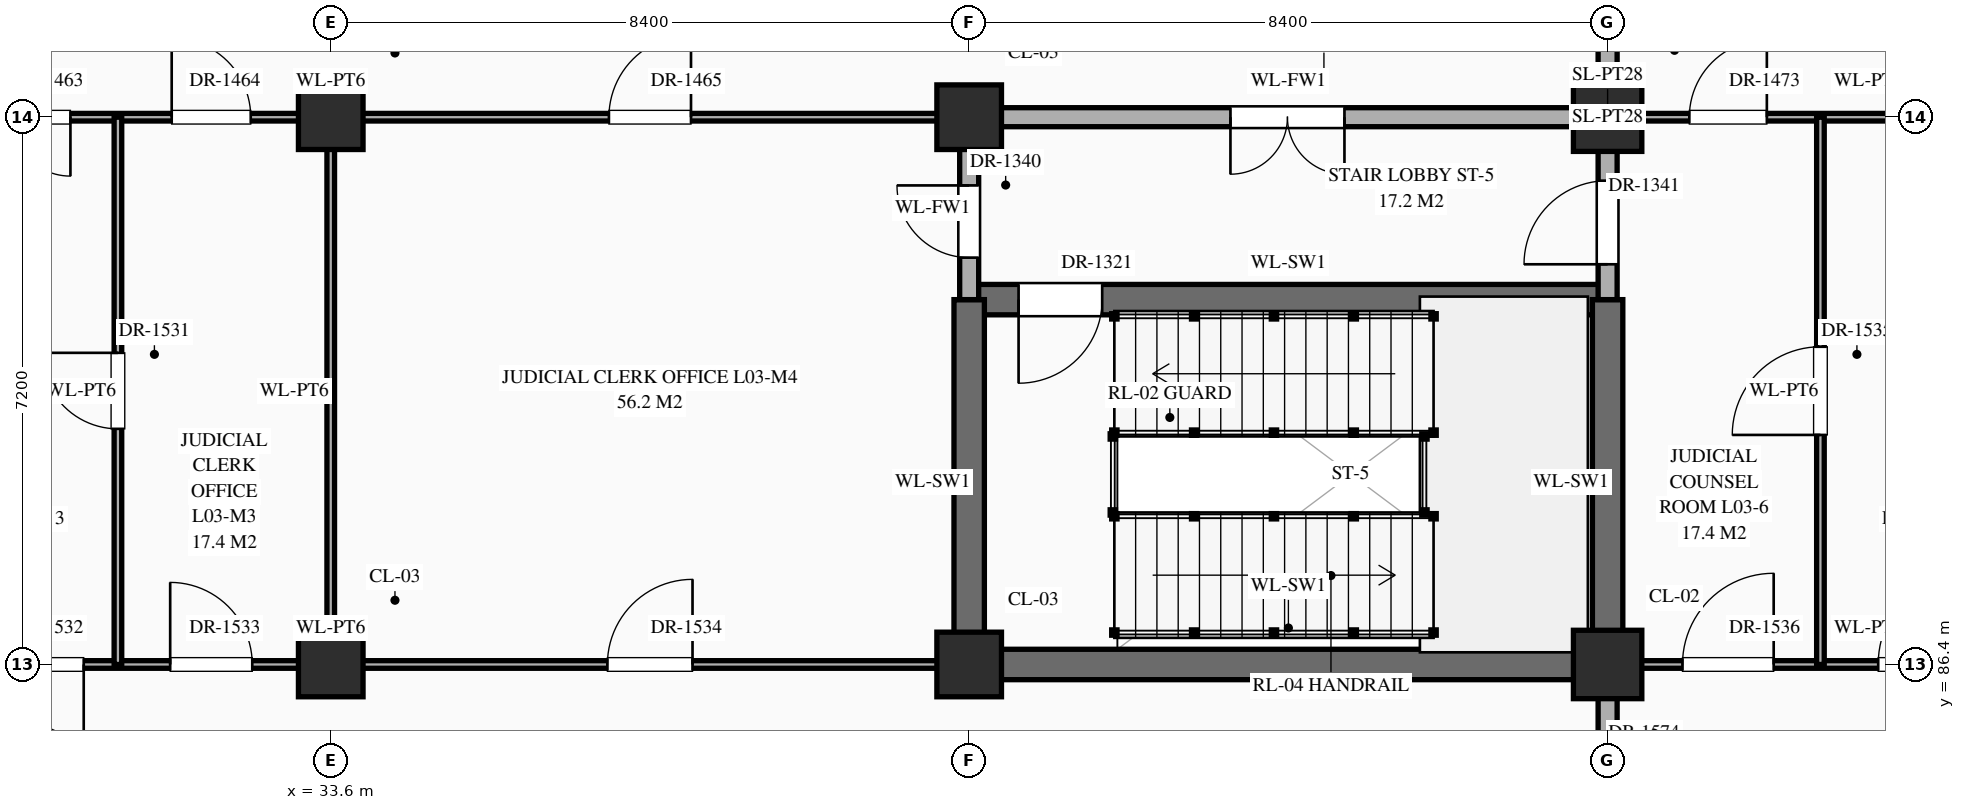
"""IFC4 building model, lengths in metres.
Left out: names, types, materials, properties, quantities, classifications, styles, units other than length and angle.
Written with IfcOpenShell. Run it as: python <this file> out.ifc"""

import sys

from ifc_helpers import new_model, si_unit, direction, frame, frame_2d, origin, origin_2d, place, context, subcontext, project, spatial, rectangle, extrude, element, fill, save


model = new_model("IFC4")
c1 = context("Model", 3, precision=1e-05, world=origin(), true_north=direction((0.0, 1.0)))
c2 = subcontext(c1, "Body", "Model", "MODEL_VIEW")
j1 = project(units=[si_unit("LENGTHUNIT", "METRE"), si_unit("PLANEANGLEUNIT", "RADIAN")], contexts=[c1])
p1 = place(None, origin())
s1 = spatial("IfcSite", under=j1, at=p1, CompositionType="ELEMENT")
p2 = place(p1, origin())
s2 = spatial("IfcBuilding", under=s1, at=p2, CompositionType="ELEMENT")
p3 = place(p2, frame((0.0, 0.0, 10.8)))
s3 = spatial("IfcBuildingStorey", under=s2, at=p3, CompositionType="ELEMENT", Elevation=10.8)
for number, where, z_axis, x_axis in (
    (1, (33.6, 86.4, 0.0), (0.0, 0.0, 1.0), (1.0, 0.0, 0.0)),
    (2, (33.6, 93.6, 0.0), (0.0, 0.0, 1.0), (1.0, 0.0, 0.0)),
    (3, (42.0, 86.4, 0.0), (0.0, 0.0, 1.0), (1.0, 0.0, 0.0)),
    (4, (42.0, 93.6, 0.0), (0.0, 0.0, 1.0), (1.0, 0.0, 0.0)),
):
    element("IfcColumn", number, at=place(p3, frame(where, z_axis=z_axis, x_axis=x_axis)), inside=s3, PredefinedType="COLUMN", context=c2, shape_type="SweptSolid", body=[
        extrude(rectangle(XDim=0.85, YDim=0.85, at=origin_2d()), origin(), (0.0, 0.0, 1.0), 5.4),
    ])
for number, where, z_axis, x_axis in (
    (5, (50.4, 86.4, 0.0), (0.0, 0.0, 1.0), (1.0, 0.0, 0.0)),
    (6, (50.4, 93.6, 0.0), (0.0, 0.0, 1.0), (1.0, 0.0, 0.0)),
):
    element("IfcColumn", number, at=place(p3, frame(where, z_axis=z_axis, x_axis=x_axis)), inside=s3, PredefinedType="COLUMN", context=c2, shape_type="SweptSolid", body=[
        extrude(rectangle(XDim=0.9, YDim=0.9, at=origin_2d()), origin(), (0.0, 0.0, 1.0), 5.4),
    ])
p4 = place(p3, frame((25.2, 86.4, 0.0), z_axis=(0.0, 0.0, 1.0), x_axis=(1.0, 0.0, 0.0)))
e7 = element("IfcWall", 7, at=p4, inside=s3, PredefinedType="STANDARD", context=c2, shape_type="SweptSolid", body=[
    extrude(rectangle(XDim=16.8, YDim=0.1, at=frame_2d((8.4, 0.0))), origin(), (0.0, 0.0, 1.0), 4.27),
])
p5 = place(p4, frame((1.093, 0.0, 0.0)))
e8 = element("IfcOpeningElement", 8, at=p5, cuts=e7, PredefinedType="OPENING", context=c2, shape_type="SweptSolid", body=[
    extrude(rectangle(XDim=0.96, YDim=2.2, at=frame_2d((0.48, 1.1))), frame((0.0, 0.062, 0.0), z_axis=(0.0, -1.0, 0.0), x_axis=(1.0, 0.0, 0.0)), (0.0, 0.0, 1.0), 0.124),
])
p6 = place(p4, frame((3.25, 0.0, 0.0)))
e9 = element("IfcOpeningElement", 9, at=p6, cuts=e7, PredefinedType="OPENING", context=c2, shape_type="SweptSolid", body=[
    extrude(rectangle(XDim=1.9, YDim=2.5, at=frame_2d((0.95, 1.25))), frame((0.0, 0.062, 0.0), z_axis=(0.0, -1.0, 0.0), x_axis=(1.0, 0.0, 0.0)), (0.0, 0.0, 1.0), 0.124),
])
p7 = place(p4, frame((6.288, 0.0, 0.0)))
e10 = element("IfcOpeningElement", 10, at=p7, cuts=e7, PredefinedType="OPENING", context=c2, shape_type="SweptSolid", body=[
    extrude(rectangle(XDim=1.08, YDim=2.25, at=frame_2d((0.54, 1.125))), frame((0.0, 0.062, 0.0), z_axis=(0.0, -1.0, 0.0), x_axis=(1.0, 0.0, 0.0)), (0.0, 0.0, 1.0), 0.124),
])
p8 = place(p4, frame((12.04, 0.0, 0.0)))
e11 = element("IfcOpeningElement", 11, at=p8, cuts=e7, PredefinedType="OPENING", context=c2, shape_type="SweptSolid", body=[
    extrude(rectangle(XDim=1.12, YDim=2.25, at=frame_2d((0.56, 1.125))), frame((0.0, 0.062, 0.0), z_axis=(0.0, -1.0, 0.0), x_axis=(1.0, 0.0, 0.0)), (0.0, 0.0, 1.0), 0.124),
])
p9 = place(p3, frame((42.0, 86.4, 0.0), z_axis=(0.0, 0.0, 1.0), x_axis=(1.0, 0.0, 0.0)))
e12 = element("IfcWall", 12, at=p9, inside=s3, PredefinedType="SHEAR", context=c2, shape_type="SweptSolid", body=[
    extrude(rectangle(XDim=8.4, YDim=0.4, at=frame_2d((4.2, 0.0))), origin(), (0.0, 0.0, 1.0), 5.12),
])
p10 = place(p3, frame((50.4, 86.4, 0.0), z_axis=(0.0, 0.0, 1.0), x_axis=(1.0, 0.0, 0.0)))
e13 = element("IfcWall", 13, at=p10, inside=s3, PredefinedType="STANDARD", context=c2, shape_type="SweptSolid", body=[
    extrude(rectangle(XDim=8.4, YDim=0.1, at=frame_2d((4.2, 0.0))), origin(), (0.0, 0.0, 1.0), 4.27),
])
p11 = place(p10, frame((0.985, 0.0, 0.0)))
e14 = element("IfcOpeningElement", 14, at=p11, cuts=e13, PredefinedType="OPENING", context=c2, shape_type="SweptSolid", body=[
    extrude(rectangle(XDim=1.2, YDim=2.35, at=frame_2d((0.6, 1.175))), frame((0.0, 0.062, 0.0), z_axis=(0.0, -1.0, 0.0), x_axis=(1.0, 0.0, 0.0)), (0.0, 0.0, 1.0), 0.124),
])
p12 = place(p10, frame((3.56, 0.0, 0.0)))
e15 = element("IfcOpeningElement", 15, at=p12, cuts=e13, PredefinedType="OPENING", context=c2, shape_type="SweptSolid", body=[
    extrude(rectangle(XDim=1.28, YDim=2.35, at=frame_2d((0.64, 1.175))), frame((0.0, 0.062, 0.0), z_axis=(0.0, -1.0, 0.0), x_axis=(1.0, 0.0, 0.0)), (0.0, 0.0, 1.0), 0.124),
])
p13 = place(p10, frame((6.345, 0.0, 0.0)))
e16 = element("IfcOpeningElement", 16, at=p13, cuts=e13, PredefinedType="OPENING", context=c2, shape_type="SweptSolid", body=[
    extrude(rectangle(XDim=0.94, YDim=2.3, at=frame_2d((0.47, 1.15))), frame((0.0, 0.062, 0.0), z_axis=(0.0, -1.0, 0.0), x_axis=(1.0, 0.0, 0.0)), (0.0, 0.0, 1.0), 0.124),
])
p14 = place(p3, frame((42.0, 91.2, 0.0), z_axis=(0.0, 0.0, 1.0), x_axis=(1.0, 0.0, 0.0)))
e17 = element("IfcWall", 17, at=p14, inside=s3, PredefinedType="SHEAR", context=c2, shape_type="SweptSolid", body=[
    extrude(rectangle(XDim=8.4, YDim=0.4, at=frame_2d((4.2, 0.0))), origin(), (0.0, 0.0, 1.0), 5.12),
])
p15 = place(p14, frame((0.65, 0.0, 0.0)))
e18 = element("IfcOpeningElement", 18, at=p15, cuts=e17, PredefinedType="OPENING", context=c2, shape_type="SweptSolid", body=[
    extrude(rectangle(XDim=1.1, YDim=2.2, at=frame_2d((0.55, 1.1))), frame((0.0, 0.212, 0.0), z_axis=(0.0, -1.0, 0.0), x_axis=(1.0, 0.0, 0.0)), (0.0, 0.0, 1.0), 0.424),
])
p16 = place(p3, frame((25.2, 93.6, 0.0), z_axis=(0.0, 0.0, 1.0), x_axis=(1.0, 0.0, 0.0)))
e19 = element("IfcWall", 19, at=p16, inside=s3, PredefinedType="STANDARD", context=c2, shape_type="SweptSolid", body=[
    extrude(rectangle(XDim=16.8, YDim=0.1, at=frame_2d((8.4, 0.0))), origin(), (0.0, 0.0, 1.0), 4.27),
])
p17 = place(p16, frame((1.093, 0.0, 0.0)))
e20 = element("IfcOpeningElement", 20, at=p17, cuts=e19, PredefinedType="OPENING", context=c2, shape_type="SweptSolid", body=[
    extrude(rectangle(XDim=0.96, YDim=2.2, at=frame_2d((0.48, 1.1))), frame((0.0, 0.062, 0.0), z_axis=(0.0, -1.0, 0.0), x_axis=(1.0, 0.0, 0.0)), (0.0, 0.0, 1.0), 0.124),
])
p18 = place(p16, frame((3.425, 0.0, 0.0)))
e21 = element("IfcOpeningElement", 21, at=p18, cuts=e19, PredefinedType="OPENING", context=c2, shape_type="SweptSolid", body=[
    extrude(rectangle(XDim=1.55, YDim=2.35, at=frame_2d((0.775, 1.175))), frame((0.0, 0.062, 0.0), z_axis=(0.0, -1.0, 0.0), x_axis=(1.0, 0.0, 0.0)), (0.0, 0.0, 1.0), 0.124),
])
p19 = place(p16, frame((6.308, 0.0, 0.0)))
e22 = element("IfcOpeningElement", 22, at=p19, cuts=e19, PredefinedType="OPENING", context=c2, shape_type="SweptSolid", body=[
    extrude(rectangle(XDim=1.04, YDim=2.2, at=frame_2d((0.52, 1.1))), frame((0.0, 0.062, 0.0), z_axis=(0.0, -1.0, 0.0), x_axis=(1.0, 0.0, 0.0)), (0.0, 0.0, 1.0), 0.124),
])
p20 = place(p16, frame((12.06, 0.0, 0.0)))
e23 = element("IfcOpeningElement", 23, at=p20, cuts=e19, PredefinedType="OPENING", context=c2, shape_type="SweptSolid", body=[
    extrude(rectangle(XDim=1.08, YDim=2.25, at=frame_2d((0.54, 1.125))), frame((0.0, 0.062, 0.0), z_axis=(0.0, -1.0, 0.0), x_axis=(1.0, 0.0, 0.0)), (0.0, 0.0, 1.0), 0.124),
])
p21 = place(p3, frame((42.0, 93.6, 0.0), z_axis=(0.0, 0.0, 1.0), x_axis=(1.0, 0.0, 0.0)))
e24 = element("IfcWall", 24, at=p21, inside=s3, PredefinedType="STANDARD", context=c2, shape_type="SweptSolid", body=[
    extrude(rectangle(XDim=8.4, YDim=0.25, at=frame_2d((4.2, 0.0))), origin(), (0.0, 0.0, 1.0), 4.27),
])
p22 = place(p21, frame((3.438, 0.0, 0.0)))
e25 = element("IfcOpeningElement", 25, at=p22, cuts=e24, PredefinedType="OPENING", context=c2, shape_type="SweptSolid", body=[
    extrude(rectangle(XDim=1.5, YDim=2.25, at=frame_2d((0.75, 1.125))), frame((0.0, 0.137, 0.0), z_axis=(0.0, -1.0, 0.0), x_axis=(1.0, 0.0, 0.0)), (0.0, 0.0, 1.0), 0.274),
])
p23 = place(p3, frame((50.4, 93.6, 0.0), z_axis=(0.0, 0.0, 1.0), x_axis=(1.0, 0.0, 0.0)))
e26 = element("IfcWall", 26, at=p23, inside=s3, PredefinedType="STANDARD", context=c2, shape_type="SweptSolid", body=[
    extrude(rectangle(XDim=8.4, YDim=0.1, at=frame_2d((4.2, 0.0))), origin(), (0.0, 0.0, 1.0), 4.27),
])
p24 = place(p23, frame((1.075, 0.0, 0.0)))
e27 = element("IfcOpeningElement", 27, at=p24, cuts=e26, PredefinedType="OPENING", context=c2, shape_type="SweptSolid", body=[
    extrude(rectangle(XDim=1.02, YDim=2.4, at=frame_2d((0.51, 1.2))), frame((0.0, 0.062, 0.0), z_axis=(0.0, -1.0, 0.0), x_axis=(1.0, 0.0, 0.0)), (0.0, 0.0, 1.0), 0.124),
])
p25 = place(p23, frame((3.67, 0.0, 0.0)))
e28 = element("IfcOpeningElement", 28, at=p25, cuts=e26, PredefinedType="OPENING", context=c2, shape_type="SweptSolid", body=[
    extrude(rectangle(XDim=1.06, YDim=2.4, at=frame_2d((0.53, 1.2))), frame((0.0, 0.062, 0.0), z_axis=(0.0, -1.0, 0.0), x_axis=(1.0, 0.0, 0.0)), (0.0, 0.0, 1.0), 0.124),
])
p26 = place(p23, frame((6.245, 0.0, 0.0)))
e29 = element("IfcOpeningElement", 29, at=p26, cuts=e26, PredefinedType="OPENING", context=c2, shape_type="SweptSolid", body=[
    extrude(rectangle(XDim=1.14, YDim=2.4, at=frame_2d((0.57, 1.2))), frame((0.0, 0.062, 0.0), z_axis=(0.0, -1.0, 0.0), x_axis=(1.0, 0.0, 0.0)), (0.0, 0.0, 1.0), 0.124),
])
p27 = place(p3, frame((30.8, 86.4, 0.0), z_axis=(0.0, 0.0, 1.0), x_axis=(0.0, 1.0, 0.0)))
e30 = element("IfcWall", 30, at=p27, inside=s3, PredefinedType="STANDARD", context=c2, shape_type="SweptSolid", body=[
    extrude(rectangle(XDim=7.2, YDim=0.1, at=frame_2d((3.6, 0.0))), origin(), (0.0, 0.0, 1.0), 5.12),
])
p28 = place(p27, frame((3.1, 0.0, 0.0)))
e31 = element("IfcOpeningElement", 31, at=p28, cuts=e30, PredefinedType="OPENING", context=c2, shape_type="SweptSolid", body=[
    extrude(rectangle(XDim=1.0, YDim=2.25, at=frame_2d((0.5, 1.125))), frame((0.0, 0.062, 0.0), z_axis=(0.0, -1.0, 0.0), x_axis=(1.0, 0.0, 0.0)), (0.0, 0.0, 1.0), 0.124),
])
p29 = place(p3, frame((33.6, 86.4, 0.0), z_axis=(0.0, 0.0, 1.0), x_axis=(0.0, 1.0, 0.0)))
e32 = element("IfcWall", 32, at=p29, inside=s3, PredefinedType="STANDARD", context=c2, shape_type="SweptSolid", body=[
    extrude(rectangle(XDim=7.2, YDim=0.1, at=frame_2d((3.6, 0.0))), origin(), (0.0, 0.0, 1.0), 4.37),
])
p30 = place(p3, frame((42.0, 86.4, 0.0), z_axis=(0.0, 0.0, 1.0), x_axis=(0.0, 1.0, 0.0)))
e33 = element("IfcWall", 33, at=p30, inside=s3, PredefinedType="SHEAR", context=c2, shape_type="SweptSolid", body=[
    extrude(rectangle(XDim=4.8, YDim=0.4, at=frame_2d((2.4, 0.0))), origin(), (0.0, 0.0, 1.0), 5.12),
])
p31 = place(p3, frame((42.0, 91.2, 0.0), z_axis=(0.0, 0.0, 1.0), x_axis=(0.0, 1.0, 0.0)))
e34 = element("IfcWall", 34, at=p31, inside=s3, PredefinedType="STANDARD", context=c2, shape_type="SweptSolid", body=[
    extrude(rectangle(XDim=2.4, YDim=0.25, at=frame_2d((1.2, 0.0))), origin(), (0.0, 0.0, 1.0), 4.37),
])
p32 = place(p31, frame((0.552, 0.0, 0.0)))
e35 = element("IfcOpeningElement", 35, at=p32, cuts=e34, PredefinedType="OPENING", context=c2, shape_type="SweptSolid", body=[
    extrude(rectangle(XDim=0.95, YDim=2.15, at=frame_2d((0.475, 1.075))), frame((0.0, 0.137, 0.0), z_axis=(0.0, -1.0, 0.0), x_axis=(1.0, 0.0, 0.0)), (0.0, 0.0, 1.0), 0.274),
])
p33 = place(p3, frame((50.4, 79.24, 0.0), z_axis=(0.0, 0.0, 1.0), x_axis=(0.0, 1.0, 0.0)))
e36 = element("IfcWall", 36, at=p33, inside=s3, PredefinedType="STANDARD", context=c2, shape_type="SweptSolid", body=[
    extrude(rectangle(XDim=7.16, YDim=0.25, at=frame_2d((3.58, 0.0))), origin(), (0.0, 0.0, 1.0), 4.37),
])
p34 = place(p33, frame((5.3, 0.0, 0.0)))
e37 = element("IfcOpeningElement", 37, at=p34, cuts=e36, PredefinedType="OPENING", context=c2, shape_type="SweptSolid", body=[
    extrude(rectangle(XDim=0.95, YDim=2.15, at=frame_2d((0.475, 1.075))), frame((0.0, 0.137, 0.0), z_axis=(0.0, -1.0, 0.0), x_axis=(1.0, 0.0, 0.0)), (0.0, 0.0, 1.0), 0.274),
])
p35 = place(p3, frame((50.4, 86.4, 0.0), z_axis=(0.0, 0.0, 1.0), x_axis=(0.0, 1.0, 0.0)))
e38 = element("IfcWall", 38, at=p35, inside=s3, PredefinedType="SHEAR", context=c2, shape_type="SweptSolid", body=[
    extrude(rectangle(XDim=4.8, YDim=0.4, at=frame_2d((2.4, 0.0))), origin(), (0.0, 0.0, 1.0), 5.12),
])
p36 = place(p3, frame((50.4, 91.2, 0.0), z_axis=(0.0, 0.0, 1.0), x_axis=(0.0, 1.0, 0.0)))
e39 = element("IfcWall", 39, at=p36, inside=s3, PredefinedType="STANDARD", context=c2, shape_type="SweptSolid", body=[
    extrude(rectangle(XDim=13.2, YDim=0.25, at=frame_2d((6.6, 0.0))), origin(), (0.0, 0.0, 1.0), 4.37),
])
p37 = place(p36, frame((0.465, 0.0, 0.0)))
e40 = element("IfcOpeningElement", 40, at=p37, cuts=e39, PredefinedType="OPENING", context=c2, shape_type="SweptSolid", body=[
    extrude(rectangle(XDim=1.1, YDim=2.2, at=frame_2d((0.55, 1.1))), frame((0.0, 0.137, 0.0), z_axis=(0.0, -1.0, 0.0), x_axis=(1.0, 0.0, 0.0)), (0.0, 0.0, 1.0), 0.274),
])
p38 = place(p36, frame((10.485, 0.0, 0.0)))
e41 = element("IfcOpeningElement", 41, at=p38, cuts=e39, PredefinedType="OPENING", context=c2, shape_type="SweptSolid", body=[
    extrude(rectangle(XDim=1.0, YDim=2.2, at=frame_2d((0.5, 1.1))), frame((0.0, 0.137, 0.0), z_axis=(0.0, -1.0, 0.0), x_axis=(1.0, 0.0, 0.0)), (0.0, 0.0, 1.0), 0.274),
])
p39 = place(p36, frame((3.285, 0.0, 0.0)))
e42 = element("IfcOpeningElement", 42, at=p39, cuts=e39, PredefinedType="OPENING", context=c2, shape_type="SweptSolid", body=[
    extrude(rectangle(XDim=1.0, YDim=2.2, at=frame_2d((0.5, 1.1))), frame((0.0, 0.137, 0.0), z_axis=(0.0, -1.0, 0.0), x_axis=(1.0, 0.0, 0.0)), (0.0, 0.0, 1.0), 0.274),
])
p40 = place(p3, frame((53.2, 86.4, 0.0), z_axis=(0.0, 0.0, 1.0), x_axis=(0.0, 1.0, 0.0)))
e43 = element("IfcWall", 43, at=p40, inside=s3, PredefinedType="STANDARD", context=c2, shape_type="SweptSolid", body=[
    extrude(rectangle(XDim=7.2, YDim=0.1, at=frame_2d((3.6, 0.0))), origin(), (0.0, 0.0, 1.0), 5.12),
])
p41 = place(p40, frame((3.02, 0.0, 0.0)))
e44 = element("IfcOpeningElement", 44, at=p41, cuts=e43, PredefinedType="OPENING", context=c2, shape_type="SweptSolid", body=[
    extrude(rectangle(XDim=1.16, YDim=2.3, at=frame_2d((0.58, 1.15))), frame((0.0, 0.062, 0.0), z_axis=(0.0, -1.0, 0.0), x_axis=(1.0, 0.0, 0.0)), (0.0, 0.0, 1.0), 0.124),
])
p42 = place(p15, frame((1.1, 0.0, 0.0), z_axis=(0.0, 0.0, 1.0), x_axis=(-1.0, 0.0, 0.0)))
e45 = element("IfcDoor", 45, at=p42, inside=s3, OperationType="SINGLE_SWING_RIGHT", PredefinedType="DOOR", context=c2, shape_type="SweptSolid", body=[
    extrude(rectangle(XDim=1.1, YDim=2.2, at=frame_2d((0.55, 1.1))), frame((0.0, 0.025, 0.0), z_axis=(0.0, -1.0, 0.0), x_axis=(1.0, 0.0, 0.0)), (0.0, 0.0, 1.0), 0.05),
])
fill(e18, e45)
p43 = place(p22, frame((1.5, 0.0, 0.0), z_axis=(0.0, 0.0, 1.0), x_axis=(-1.0, 0.0, 0.0)))
e46 = element("IfcDoor", 46, at=p43, inside=s3, OperationType="DOUBLE_DOOR_SINGLE_SWING", PredefinedType="DOOR", context=c2, shape_type="SweptSolid", body=[
    extrude(rectangle(XDim=1.5, YDim=2.25, at=frame_2d((0.75, 1.125))), frame((0.0, 0.025, 0.0), z_axis=(0.0, -1.0, 0.0), x_axis=(1.0, 0.0, 0.0)), (0.0, 0.0, 1.0), 0.05),
])
fill(e25, e46)
p44 = place(p32, origin())
e47 = element("IfcDoor", 47, at=p44, inside=s3, OperationType="SINGLE_SWING_RIGHT", PredefinedType="DOOR", context=c2, shape_type="SweptSolid", body=[
    extrude(rectangle(XDim=0.95, YDim=2.15, at=frame_2d((0.475, 1.075))), frame((0.0, 0.025, 0.0), z_axis=(0.0, -1.0, 0.0), x_axis=(1.0, 0.0, 0.0)), (0.0, 0.0, 1.0), 0.05),
])
fill(e35, e47)
p45 = place(p37, origin())
e48 = element("IfcDoor", 48, at=p45, inside=s3, OperationType="SINGLE_SWING_LEFT", PredefinedType="DOOR", context=c2, shape_type="SweptSolid", body=[
    extrude(rectangle(XDim=1.1, YDim=2.2, at=frame_2d((0.55, 1.1))), frame((0.0, 0.025, 0.0), z_axis=(0.0, -1.0, 0.0), x_axis=(1.0, 0.0, 0.0)), (0.0, 0.0, 1.0), 0.05),
])
fill(e40, e48)
p46 = place(p18, frame((1.55, 0.0, 0.0), z_axis=(0.0, 0.0, 1.0), x_axis=(-1.0, 0.0, 0.0)))
e49 = element("IfcDoor", 49, at=p46, inside=s3, OperationType="DOUBLE_DOOR_SINGLE_SWING", PredefinedType="DOOR", context=c2, shape_type="SweptSolid", body=[
    extrude(rectangle(XDim=1.55, YDim=2.35, at=frame_2d((0.775, 1.175))), frame((0.0, 0.025, 0.0), z_axis=(0.0, -1.0, 0.0), x_axis=(1.0, 0.0, 0.0)), (0.0, 0.0, 1.0), 0.05),
])
fill(e21, e49)
p47 = place(p19, origin())
e50 = element("IfcDoor", 50, at=p47, inside=s3, OperationType="SINGLE_SWING_LEFT", PredefinedType="DOOR", context=c2, shape_type="SweptSolid", body=[
    extrude(rectangle(XDim=1.04, YDim=2.2, at=frame_2d((0.52, 1.1))), frame((0.0, 0.025, 0.0), z_axis=(0.0, -1.0, 0.0), x_axis=(1.0, 0.0, 0.0)), (0.0, 0.0, 1.0), 0.05),
])
fill(e22, e50)
p48 = place(p20, origin())
e51 = element("IfcDoor", 51, at=p48, inside=s3, OperationType="SINGLE_SWING_RIGHT", PredefinedType="DOOR", context=c2, shape_type="SweptSolid", body=[
    extrude(rectangle(XDim=1.08, YDim=2.25, at=frame_2d((0.54, 1.125))), frame((0.0, 0.025, 0.0), z_axis=(0.0, -1.0, 0.0), x_axis=(1.0, 0.0, 0.0)), (0.0, 0.0, 1.0), 0.05),
])
fill(e23, e51)
p49 = place(p24, origin())
e52 = element("IfcDoor", 52, at=p49, inside=s3, OperationType="SINGLE_SWING_RIGHT", PredefinedType="DOOR", context=c2, shape_type="SweptSolid", body=[
    extrude(rectangle(XDim=1.02, YDim=2.4, at=frame_2d((0.51, 1.2))), frame((0.0, 0.025, 0.0), z_axis=(0.0, -1.0, 0.0), x_axis=(1.0, 0.0, 0.0)), (0.0, 0.0, 1.0), 0.05),
])
fill(e27, e52)
p50 = place(p28, origin())
e53 = element("IfcDoor", 53, at=p50, inside=s3, OperationType="SINGLE_SWING_RIGHT", PredefinedType="DOOR", context=c2, shape_type="SweptSolid", body=[
    extrude(rectangle(XDim=1.0, YDim=2.25, at=frame_2d((0.5, 1.125))), frame((0.0, 0.025, 0.0), z_axis=(0.0, -1.0, 0.0), x_axis=(1.0, 0.0, 0.0)), (0.0, 0.0, 1.0), 0.05),
])
fill(e31, e53)
p51 = place(p6, frame((1.9, 0.0, 0.0), z_axis=(0.0, 0.0, 1.0), x_axis=(-1.0, 0.0, 0.0)))
e54 = element("IfcDoor", 54, at=p51, inside=s3, OperationType="DOUBLE_DOOR_SINGLE_SWING", PredefinedType="DOOR", context=c2, shape_type="SweptSolid", body=[
    extrude(rectangle(XDim=1.9, YDim=2.5, at=frame_2d((0.95, 1.25))), frame((0.0, 0.025, 0.0), z_axis=(0.0, -1.0, 0.0), x_axis=(1.0, 0.0, 0.0)), (0.0, 0.0, 1.0), 0.05),
])
fill(e9, e54)
p52 = place(p7, origin())
e55 = element("IfcDoor", 55, at=p52, inside=s3, OperationType="SINGLE_SWING_LEFT", PredefinedType="DOOR", context=c2, shape_type="SweptSolid", body=[
    extrude(rectangle(XDim=1.08, YDim=2.25, at=frame_2d((0.54, 1.125))), frame((0.0, 0.025, 0.0), z_axis=(0.0, -1.0, 0.0), x_axis=(1.0, 0.0, 0.0)), (0.0, 0.0, 1.0), 0.05),
])
fill(e10, e55)
p53 = place(p8, origin())
e56 = element("IfcDoor", 56, at=p53, inside=s3, OperationType="SINGLE_SWING_RIGHT", PredefinedType="DOOR", context=c2, shape_type="SweptSolid", body=[
    extrude(rectangle(XDim=1.12, YDim=2.25, at=frame_2d((0.56, 1.125))), frame((0.0, 0.025, 0.0), z_axis=(0.0, -1.0, 0.0), x_axis=(1.0, 0.0, 0.0)), (0.0, 0.0, 1.0), 0.05),
])
fill(e11, e56)
p54 = place(p41, origin())
e57 = element("IfcDoor", 57, at=p54, inside=s3, OperationType="SINGLE_SWING_LEFT", PredefinedType="DOOR", context=c2, shape_type="SweptSolid", body=[
    extrude(rectangle(XDim=1.16, YDim=2.3, at=frame_2d((0.58, 1.15))), frame((0.0, 0.025, 0.0), z_axis=(0.0, -1.0, 0.0), x_axis=(1.0, 0.0, 0.0)), (0.0, 0.0, 1.0), 0.05),
])
fill(e44, e57)
p55 = place(p11, origin())
e58 = element("IfcDoor", 58, at=p55, inside=s3, OperationType="SINGLE_SWING_RIGHT", PredefinedType="DOOR", context=c2, shape_type="SweptSolid", body=[
    extrude(rectangle(XDim=1.2, YDim=2.35, at=frame_2d((0.6, 1.175))), frame((0.0, 0.025, 0.0), z_axis=(0.0, -1.0, 0.0), x_axis=(1.0, 0.0, 0.0)), (0.0, 0.0, 1.0), 0.05),
])
fill(e14, e58)
p56 = place(p12, origin())
e59 = element("IfcDoor", 59, at=p56, inside=s3, OperationType="SINGLE_SWING_RIGHT", PredefinedType="DOOR", context=c2, shape_type="SweptSolid", body=[
    extrude(rectangle(XDim=1.28, YDim=2.35, at=frame_2d((0.64, 1.175))), frame((0.0, 0.025, 0.0), z_axis=(0.0, -1.0, 0.0), x_axis=(1.0, 0.0, 0.0)), (0.0, 0.0, 1.0), 0.05),
])
fill(e15, e59)
save(model, sys.argv[1])
